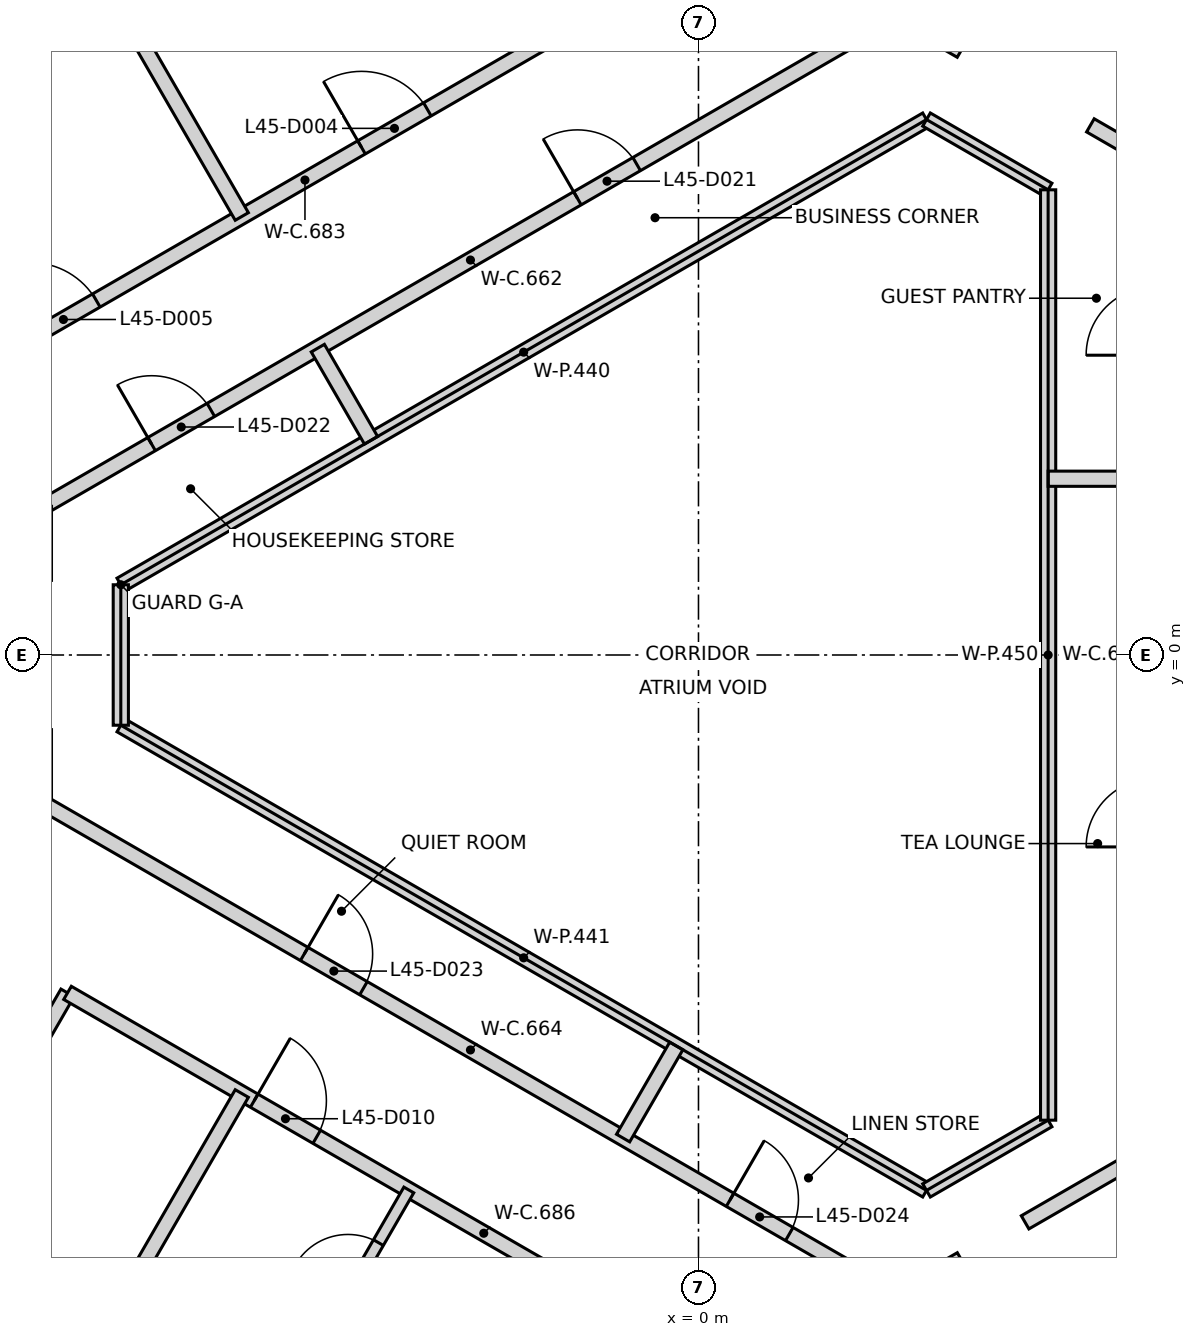
"""IFC4 building model, lengths in metres.
Left out: names, types, materials, properties, quantities, classifications, styles, units other than length and angle.
Written with IfcOpenShell. Run it as: python <this file> out.ifc"""

import sys

from ifc_helpers import new_model, si_unit, direction, frame, frame_2d, origin, place, context, subcontext, project, spatial, rectangle, extrude, element, fill, save


model = new_model("IFC4")
c1 = context("Model", 3, precision=1e-05, world=origin(), true_north=direction((0.0, 1.0)))
c2 = subcontext(c1, "Body", "Model", "MODEL_VIEW")
j1 = project(units=[si_unit("LENGTHUNIT", "METRE"), si_unit("PLANEANGLEUNIT", "RADIAN")], contexts=[c1])
p1 = place(None, origin())
s1 = spatial("IfcSite", under=j1, at=p1, CompositionType="ELEMENT")
p2 = place(p1, origin())
s2 = spatial("IfcBuilding", under=s1, at=p2, CompositionType="ELEMENT")
p3 = place(p2, frame((0.0, 0.0, 182.8)))
s3 = spatial("IfcBuildingStorey", under=s2, at=p3, CompositionType="ELEMENT", Elevation=182.8)
p4 = place(p3, frame((10.42, 6.498, 0.0), z_axis=(0.0, 0.0, 1.0), x_axis=(-0.866021906294, 0.500006057782, 0.0)))
e1 = element("IfcWall", 1, at=p4, inside=s3, PredefinedType="SHEAR", context=c2, shape_type="SweptSolid", body=[
    extrude(rectangle(XDim=11.55, YDim=0.25, at=frame_2d((5.775, 0.0))), origin(), (0.0, 0.0, 1.0), 3.25),
])
p5 = place(p4, frame((10.025, 0.0, 0.0)))
e2 = element("IfcOpeningElement", 2, at=p5, cuts=e1, PredefinedType="OPENING", context=c2, shape_type="SweptSolid", body=[
    extrude(rectangle(XDim=1.2, YDim=2.1, at=frame_2d((0.6, 1.05))), frame((0.0, 0.135, 0.0), z_axis=(0.0, -1.0, 0.0), x_axis=(1.0, 0.0, 0.0)), (0.0, 0.0, 1.0), 0.27),
])
p6 = place(p4, frame((8.725, 0.0, 0.0)))
e3 = element("IfcOpeningElement", 3, at=p6, cuts=e1, PredefinedType="OPENING", context=c2, shape_type="SweptSolid", body=[
    extrude(rectangle(XDim=1.2, YDim=2.1, at=frame_2d((0.6, 1.05))), frame((0.0, 0.135, 0.0), z_axis=(0.0, -1.0, 0.0), x_axis=(1.0, 0.0, 0.0)), (0.0, 0.0, 1.0), 0.27),
])
p7 = place(p3, frame((0.417, -12.273, 0.0), z_axis=(0.0, 0.0, 1.0), x_axis=(0.866021906294, 0.500006057782, 0.0)))
e4 = element("IfcWall", 4, at=p7, inside=s3, PredefinedType="SHEAR", context=c2, shape_type="SweptSolid", body=[
    extrude(rectangle(XDim=11.55, YDim=0.25, at=frame_2d((5.775, 0.0))), origin(), (0.0, 0.0, 1.0), 3.25),
])
p8 = place(p7, frame((10.025, 0.0, 0.0)))
e5 = element("IfcOpeningElement", 5, at=p8, cuts=e4, PredefinedType="OPENING", context=c2, shape_type="SweptSolid", body=[
    extrude(rectangle(XDim=1.2, YDim=2.1, at=frame_2d((0.6, 1.05))), frame((0.0, 0.135, 0.0), z_axis=(0.0, -1.0, 0.0), x_axis=(1.0, 0.0, 0.0)), (0.0, 0.0, 1.0), 0.27),
])
p9 = place(p7, frame((8.725, 0.0, 0.0)))
e6 = element("IfcOpeningElement", 6, at=p9, cuts=e4, PredefinedType="OPENING", context=c2, shape_type="SweptSolid", body=[
    extrude(rectangle(XDim=1.2, YDim=2.1, at=frame_2d((0.6, 1.05))), frame((0.0, 0.135, 0.0), z_axis=(0.0, -1.0, 0.0), x_axis=(1.0, 0.0, 0.0)), (0.0, 0.0, 1.0), 0.27),
])
p10 = place(p3, frame((-10.652, 3.087, 0.0), z_axis=(0.0, 0.0, 1.0), x_axis=(0.866016136997, 0.500016050204, 0.0)))
e7 = element("IfcWall", 7, at=p10, inside=s3, PredefinedType="PARTITIONING", context=c2, shape_type="SweptSolid", body=[
    extrude(rectangle(XDim=12.645, YDim=0.2, at=frame_2d((6.322, 0.0))), origin(), (0.0, 0.0, 1.0), 3.25),
])
p11 = place(p10, frame((10.817, 0.0, 0.0)))
e8 = element("IfcOpeningElement", 8, at=p11, cuts=e7, PredefinedType="OPENING", context=c2, shape_type="SweptSolid", body=[
    extrude(rectangle(XDim=1.0, YDim=2.1, at=frame_2d((0.5, 1.05))), frame((0.0, 0.11, 0.0), z_axis=(0.0, -1.0, 0.0), x_axis=(1.0, 0.0, 0.0)), (0.0, 0.0, 1.0), 0.22),
])
p12 = place(p10, frame((7.182, 0.0, 0.0)))
e9 = element("IfcOpeningElement", 9, at=p12, cuts=e7, PredefinedType="OPENING", context=c2, shape_type="SweptSolid", body=[
    extrude(rectangle(XDim=1.0, YDim=2.1, at=frame_2d((0.5, 1.05))), frame((0.0, 0.11, 0.0), z_axis=(0.0, -1.0, 0.0), x_axis=(1.0, 0.0, 0.0)), (0.0, 0.0, 1.0), 0.22),
])
p13 = place(p10, frame((2.153, 0.0, 0.0)))
e10 = element("IfcOpeningElement", 10, at=p13, cuts=e7, PredefinedType="OPENING", context=c2, shape_type="SweptSolid", body=[
    extrude(rectangle(XDim=1.0, YDim=2.1, at=frame_2d((0.5, 1.05))), frame((0.0, 0.11, 0.0), z_axis=(0.0, -1.0, 0.0), x_axis=(1.0, 0.0, 0.0)), (0.0, 0.0, 1.0), 0.22),
])
p14 = place(p3, frame((-9.697, -6.864, 0.0), z_axis=(0.0, 0.0, 1.0), x_axis=(0.499843530644, 0.866115722564, 0.0)))
e11 = element("IfcWall", 11, at=p14, inside=s3, PredefinedType="PARTITIONING", context=c2, shape_type="SweptSolid", body=[
    extrude(rectangle(XDim=2.793, YDim=0.2, at=frame_2d((1.396, 0.0))), origin(), (0.0, 0.0, 1.0), 3.25),
])
p15 = place(p14, frame((0.896, 0.0, 0.0)))
e12 = element("IfcOpeningElement", 12, at=p15, cuts=e11, PredefinedType="OPENING", context=c2, shape_type="SweptSolid", body=[
    extrude(rectangle(XDim=1.0, YDim=2.1, at=frame_2d((0.5, 1.05))), frame((0.0, 0.11, 0.0), z_axis=(0.0, -1.0, 0.0), x_axis=(1.0, 0.0, 0.0)), (0.0, 0.0, 1.0), 0.22),
])
p16 = place(p3, frame((-8.612, 1.956, 0.0), z_axis=(0.0, 0.0, 1.0), x_axis=(0.866034386606, 0.499984440973, 0.0)))
e13 = element("IfcWall", 13, at=p16, inside=s3, PredefinedType="PARTITIONING", context=c2, shape_type="SweptSolid", body=[
    extrude(rectangle(XDim=12.96, YDim=0.2, at=frame_2d((6.48, 0.0))), origin(), (0.0, 0.0, 1.0), 3.25),
])
p17 = place(p16, frame((8.105, 0.0, 0.0)))
e14 = element("IfcOpeningElement", 14, at=p17, cuts=e13, PredefinedType="OPENING", context=c2, shape_type="SweptSolid", body=[
    extrude(rectangle(XDim=0.9, YDim=2.1, at=frame_2d((0.45, 1.05))), frame((0.0, 0.11, 0.0), z_axis=(0.0, -1.0, 0.0), x_axis=(1.0, 0.0, 0.0)), (0.0, 0.0, 1.0), 0.22),
])
p18 = place(p16, frame((1.637, 0.0, 0.0)))
e15 = element("IfcOpeningElement", 15, at=p18, cuts=e13, PredefinedType="OPENING", context=c2, shape_type="SweptSolid", body=[
    extrude(rectangle(XDim=0.9, YDim=2.1, at=frame_2d((0.45, 1.05))), frame((0.0, 0.11, 0.0), z_axis=(0.0, -1.0, 0.0), x_axis=(1.0, 0.0, 0.0)), (0.0, 0.0, 1.0), 0.22),
])
p19 = place(p3, frame((-8.612, -1.956, 0.0), z_axis=(0.0, 0.0, 1.0), x_axis=(0.866034386606, -0.499984440973, 0.0)))
e16 = element("IfcWall", 16, at=p19, inside=s3, PredefinedType="PARTITIONING", context=c2, shape_type="SweptSolid", body=[
    extrude(rectangle(XDim=12.96, YDim=0.2, at=frame_2d((6.48, 0.0))), origin(), (0.0, 0.0, 1.0), 3.25),
])
p20 = place(p19, frame((3.955, 0.0, 0.0)))
e17 = element("IfcOpeningElement", 17, at=p20, cuts=e16, PredefinedType="OPENING", context=c2, shape_type="SweptSolid", body=[
    extrude(rectangle(XDim=0.9, YDim=2.1, at=frame_2d((0.45, 1.05))), frame((0.0, 0.11, 0.0), z_axis=(0.0, -1.0, 0.0), x_axis=(1.0, 0.0, 0.0)), (0.0, 0.0, 1.0), 0.22),
])
p21 = place(p19, frame((10.424, 0.0, 0.0)))
e18 = element("IfcOpeningElement", 18, at=p21, cuts=e16, PredefinedType="OPENING", context=c2, shape_type="SweptSolid", body=[
    extrude(rectangle(XDim=0.9, YDim=2.1, at=frame_2d((0.45, 1.05))), frame((0.0, 0.11, 0.0), z_axis=(0.0, -1.0, 0.0), x_axis=(1.0, 0.0, 0.0)), (0.0, 0.0, 1.0), 0.22),
])
p22 = place(p3, frame((-8.301, -4.445, 0.0), z_axis=(0.0, 0.0, 1.0), x_axis=(0.865969859016, -0.500096194023, 0.0)))
e19 = element("IfcWall", 19, at=p22, inside=s3, PredefinedType="PARTITIONING", context=c2, shape_type="SweptSolid", body=[
    extrude(rectangle(XDim=12.647, YDim=0.2, at=frame_2d((6.323, 0.0))), origin(), (0.0, 0.0, 1.0), 3.25),
])
p23 = place(p22, frame((2.836, 0.0, 0.0)))
e20 = element("IfcOpeningElement", 20, at=p23, cuts=e19, PredefinedType="OPENING", context=c2, shape_type="SweptSolid", body=[
    extrude(rectangle(XDim=0.95, YDim=2.1, at=frame_2d((0.475, 1.05))), frame((0.0, 0.11, 0.0), z_axis=(0.0, -1.0, 0.0), x_axis=(1.0, 0.0, 0.0)), (0.0, 0.0, 1.0), 0.22),
])
p24 = place(p22, frame((11.467, 0.0, 0.0)))
e21 = element("IfcOpeningElement", 21, at=p24, cuts=e19, PredefinedType="OPENING", context=c2, shape_type="SweptSolid", body=[
    extrude(rectangle(XDim=0.95, YDim=2.1, at=frame_2d((0.475, 1.05))), frame((0.0, 0.11, 0.0), z_axis=(0.0, -1.0, 0.0), x_axis=(1.0, 0.0, 0.0)), (0.0, 0.0, 1.0), 0.22),
])
p25 = place(p3, frame((2.612, 8.436, 0.0), z_axis=(0.0, 0.0, 1.0), x_axis=(0.866055964107, -0.499947064232, 0.0)))
e22 = element("IfcWall", 22, at=p25, inside=s3, PredefinedType="PARTITIONING", context=c2, shape_type="SweptSolid", body=[
    extrude(rectangle(XDim=0.972, YDim=0.2, at=frame_2d((0.486, 0.0))), origin(), (0.0, 0.0, 1.0), 3.25),
])
p26 = place(p3, frame((2.612, -8.437, 0.0), z_axis=(0.0, 0.0, 1.0), x_axis=(0.866026830048, 0.499997529631, 0.0)))
e23 = element("IfcWall", 23, at=p26, inside=s3, PredefinedType="PARTITIONING", context=c2, shape_type="SweptSolid", body=[
    extrude(rectangle(XDim=0.973, YDim=0.2, at=frame_2d((0.487, 0.0))), origin(), (0.0, 0.0, 1.0), 3.25),
])
p27 = place(p3, frame((4.297, -7.464, 0.0), z_axis=(0.0, 0.0, 1.0), x_axis=(0.866026378386, 0.499998311937, 0.0)))
e24 = element("IfcWall", 24, at=p27, inside=s3, PredefinedType="PARTITIONING", context=c2, shape_type="SweptSolid", body=[
    extrude(rectangle(XDim=1.966, YDim=0.2, at=frame_2d((0.983, 0.0))), origin(), (0.0, 0.0, 1.0), 3.25),
])
p28 = place(p3, frame((5.156, 6.968, 0.0), z_axis=(0.0, 0.0, 1.0), x_axis=(0.866123013327, -0.49983089719, 0.0)))
e25 = element("IfcWall", 25, at=p28, inside=s3, PredefinedType="PARTITIONING", context=c2, shape_type="SweptSolid", body=[
    extrude(rectangle(XDim=0.974, YDim=0.2, at=frame_2d((0.487, 0.0))), origin(), (0.0, 0.0, 1.0), 3.25),
])
for number, where, z_axis, x_axis in (
    (26, (-11.661, -15.561, 0.0), (0.0, 0.0, 1.0), (0.5, 0.866, 0.0)),
    (27, (-11.661, 15.561, 0.0), (0.0, 0.0, 1.0), (0.5, -0.866, 0.0)),
):
    element("IfcWall", number, at=place(p3, frame(where, z_axis=z_axis, x_axis=x_axis)), inside=s3, PredefinedType="PARTITIONING", context=c2, shape_type="SweptSolid", body=[
        extrude(rectangle(XDim=11.306, YDim=0.2, at=frame_2d((5.653, 0.0))), origin(), (0.0, 0.0, 1.0), 3.25),
    ])
for number, where, z_axis, x_axis in (
    (28, (-7.6, 0.924, 0.0), (0.0, 0.0, 1.0), (0.866, 0.5, 0.0)),
    (29, (-7.6, -0.924, 0.0), (0.0, 0.0, 1.0), (0.866, -0.5, 0.0)),
):
    element("IfcWall", number, at=place(p3, frame(where, z_axis=z_axis, x_axis=x_axis)), inside=s3, PredefinedType="PARTITIONING", context=c2, shape_type="SweptSolid", body=[
        extrude(rectangle(XDim=12.24, YDim=0.2, at=frame_2d((6.12, 0.0))), origin(), (0.0, 0.0, 1.0), 3.25),
    ])
p29 = place(p3, frame((-7.6, -0.924, 0.0), z_axis=(0.0, 0.0, 1.0), x_axis=(0.0, 1.0, 0.0)))
e30 = element("IfcWall", 30, at=p29, inside=s3, PredefinedType="PARTITIONING", context=c2, shape_type="SweptSolid", body=[
    extrude(rectangle(XDim=1.848, YDim=0.2, at=frame_2d((0.924, 0.0))), origin(), (0.0, 0.0, 1.0), 3.25),
])
p30 = place(p3, frame((-5.008, 4.037, 0.0), z_axis=(0.0, 0.0, 1.0), x_axis=(0.49996389635, -0.866046247233, 0.0)))
e31 = element("IfcWall", 31, at=p30, inside=s3, PredefinedType="PARTITIONING", context=c2, shape_type="SweptSolid", body=[
    extrude(rectangle(XDim=1.4, YDim=0.2, at=frame_2d((0.7, 0.0))), origin(), (0.0, 0.0, 1.0), 3.25),
])
p31 = place(p3, frame((-0.992, -6.355, 0.0), z_axis=(0.0, 0.0, 1.0), x_axis=(0.500059638837, 0.865990968548, 0.0)))
e32 = element("IfcWall", 32, at=p31, inside=s3, PredefinedType="PARTITIONING", context=c2, shape_type="SweptSolid", body=[
    extrude(rectangle(XDim=1.4, YDim=0.2, at=frame_2d((0.7, 0.0))), origin(), (0.0, 0.0, 1.0), 3.25),
])
for number, where, z_axis, x_axis in (
    (33, (3.0, -7.044, 0.0), (0.0, 0.0, 1.0), (0.866, 0.5, 0.0)),
    (34, (3.0, 7.044, 0.0), (0.0, 0.0, 1.0), (0.866, -0.5, 0.0)),
):
    element("IfcWall", number, at=place(p3, frame(where, z_axis=z_axis, x_axis=x_axis)), inside=s3, PredefinedType="PARTITIONING", context=c2, shape_type="SweptSolid", body=[
        extrude(rectangle(XDim=1.848, YDim=0.2, at=frame_2d((0.924, 0.0))), origin(), (0.0, 0.0, 1.0), 3.25),
    ])
p32 = place(p3, frame((4.6, -6.12, 0.0), z_axis=(0.0, 0.0, 1.0), x_axis=(0.0, 1.0, 0.0)))
e35 = element("IfcWall", 35, at=p32, inside=s3, PredefinedType="PARTITIONING", context=c2, shape_type="SweptSolid", body=[
    extrude(rectangle(XDim=12.24, YDim=0.2, at=frame_2d((6.12, 0.0))), origin(), (0.0, 0.0, 1.0), 3.25),
])
p33 = place(p3, frame((4.6, 2.319, 0.0), z_axis=(0.0, 0.0, 1.0), x_axis=(1.0, 0.0, 0.0)))
e36 = element("IfcWall", 36, at=p33, inside=s3, PredefinedType="PARTITIONING", context=c2, shape_type="SweptSolid", body=[
    extrude(rectangle(XDim=1.4, YDim=0.2, at=frame_2d((0.7, 0.0))), origin(), (0.0, 0.0, 1.0), 3.25),
])
p34 = place(p3, frame((-5.011, -9.116, 0.0), z_axis=(0.0, 0.0, 1.0), x_axis=(0.500089422704, 0.865973769406, 0.0)))
e37 = element("IfcWall", 37, at=p34, inside=s3, PredefinedType="PARTITIONING", context=c2, shape_type="SweptSolid", body=[
    extrude(rectangle(XDim=2.399, YDim=0.15, at=frame_2d((1.2, 0.0))), origin(), (0.0, 0.0, 1.0), 3.25),
])
p35 = place(p34, frame((0.8, 0.0, 0.0)))
e38 = element("IfcOpeningElement", 38, at=p35, cuts=e37, PredefinedType="OPENING", context=c2, shape_type="SweptSolid", body=[
    extrude(rectangle(XDim=0.8, YDim=2.1, at=frame_2d((0.4, 1.05))), frame((0.0, 0.085, 0.0), z_axis=(0.0, -1.0, 0.0), x_axis=(1.0, 0.0, 0.0)), (0.0, 0.0, 1.0), 0.17),
])
p36 = place(p12, origin())
e39 = element("IfcDoor", 39, at=p36, inside=s3, OperationType="SINGLE_SWING_LEFT", PredefinedType="DOOR", context=c2, shape_type="SweptSolid", body=[
    extrude(rectangle(XDim=1.0, YDim=2.1, at=frame_2d((0.5, 1.05))), frame((0.0, 0.025, 0.0), z_axis=(0.0, -1.0, 0.0), x_axis=(1.0, 0.0, 0.0)), (0.0, 0.0, 1.0), 0.05),
])
fill(e9, e39)
p37 = place(p13, origin())
e40 = element("IfcDoor", 40, at=p37, inside=s3, OperationType="SINGLE_SWING_LEFT", PredefinedType="DOOR", context=c2, shape_type="SweptSolid", body=[
    extrude(rectangle(XDim=1.0, YDim=2.1, at=frame_2d((0.5, 1.05))), frame((0.0, 0.025, 0.0), z_axis=(0.0, -1.0, 0.0), x_axis=(1.0, 0.0, 0.0)), (0.0, 0.0, 1.0), 0.05),
])
fill(e10, e40)
p38 = place(p23, frame((0.95, 0.0, 0.0), z_axis=(0.0, 0.0, 1.0), x_axis=(-1.0, 0.0, 0.0)))
e41 = element("IfcDoor", 41, at=p38, inside=s3, OperationType="SINGLE_SWING_LEFT", PredefinedType="DOOR", context=c2, shape_type="SweptSolid", body=[
    extrude(rectangle(XDim=0.95, YDim=2.1, at=frame_2d((0.475, 1.05))), frame((0.0, 0.025, 0.0), z_axis=(0.0, -1.0, 0.0), x_axis=(1.0, 0.0, 0.0)), (0.0, 0.0, 1.0), 0.05),
])
fill(e20, e41)
p39 = place(p35, origin())
e42 = element("IfcDoor", 42, at=p39, inside=s3, OperationType="SINGLE_SWING_LEFT", PredefinedType="DOOR", context=c2, shape_type="SweptSolid", body=[
    extrude(rectangle(XDim=0.8, YDim=2.1, at=frame_2d((0.4, 1.05))), frame((0.0, 0.025, 0.0), z_axis=(0.0, -1.0, 0.0), x_axis=(1.0, 0.0, 0.0)), (0.0, 0.0, 1.0), 0.05),
])
fill(e38, e42)
p40 = place(p17, frame((0.9, 0.0, 0.0), z_axis=(0.0, 0.0, 1.0), x_axis=(-1.0, 0.0, 0.0)))
e43 = element("IfcDoor", 43, at=p40, inside=s3, OperationType="SINGLE_SWING_LEFT", PredefinedType="DOOR", context=c2, shape_type="SweptSolid", body=[
    extrude(rectangle(XDim=0.9, YDim=2.1, at=frame_2d((0.45, 1.05))), frame((0.0, 0.025, 0.0), z_axis=(0.0, -1.0, 0.0), x_axis=(1.0, 0.0, 0.0)), (0.0, 0.0, 1.0), 0.05),
])
fill(e14, e43)
p41 = place(p18, frame((0.9, 0.0, 0.0), z_axis=(0.0, 0.0, 1.0), x_axis=(-1.0, 0.0, 0.0)))
e44 = element("IfcDoor", 44, at=p41, inside=s3, OperationType="SINGLE_SWING_LEFT", PredefinedType="DOOR", context=c2, shape_type="SweptSolid", body=[
    extrude(rectangle(XDim=0.9, YDim=2.1, at=frame_2d((0.45, 1.05))), frame((0.0, 0.025, 0.0), z_axis=(0.0, -1.0, 0.0), x_axis=(1.0, 0.0, 0.0)), (0.0, 0.0, 1.0), 0.05),
])
fill(e15, e44)
p42 = place(p20, origin())
e45 = element("IfcDoor", 45, at=p42, inside=s3, OperationType="SINGLE_SWING_LEFT", PredefinedType="DOOR", context=c2, shape_type="SweptSolid", body=[
    extrude(rectangle(XDim=0.9, YDim=2.1, at=frame_2d((0.45, 1.05))), frame((0.0, 0.025, 0.0), z_axis=(0.0, -1.0, 0.0), x_axis=(1.0, 0.0, 0.0)), (0.0, 0.0, 1.0), 0.05),
])
fill(e17, e45)
p43 = place(p21, origin())
e46 = element("IfcDoor", 46, at=p43, inside=s3, OperationType="SINGLE_SWING_LEFT", PredefinedType="DOOR", context=c2, shape_type="SweptSolid", body=[
    extrude(rectangle(XDim=0.9, YDim=2.1, at=frame_2d((0.45, 1.05))), frame((0.0, 0.025, 0.0), z_axis=(0.0, -1.0, 0.0), x_axis=(1.0, 0.0, 0.0)), (0.0, 0.0, 1.0), 0.05),
])
fill(e18, e46)
save(model, sys.argv[1])
